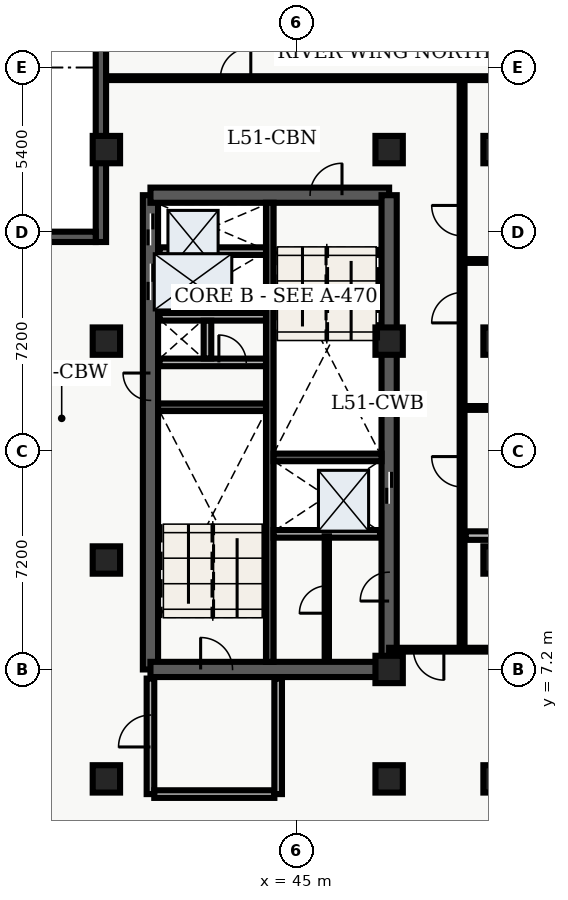
"""IFC4 building model, lengths in metres.
Left out: names, types, materials, properties, quantities, classifications, styles, units other than length and angle.
Written with IfcOpenShell. Run it as: python <this file> out.ifc"""

import sys

from ifc_helpers import new_model, entity, si_unit, converted_unit, direction, frame, origin_with_axes, origin_2d_with_axis, place, context, subcontext, project, spatial, polyline, rectangle, outline, extrude, element, fill, save


model = new_model("IFC4")
c1 = context("Model", 3, precision=1e-05, world=origin_with_axes(), true_north=direction((0.0, 1.0)))
c2 = subcontext(c1, "Body", "Model", "MODEL_VIEW")
j1 = project(units=[si_unit("LENGTHUNIT", "METRE"), converted_unit("PLANEANGLEUNIT", "DEGREE", entity("IfcPlaneAngleMeasure", 0.017), si_unit("PLANEANGLEUNIT", "RADIAN"), dimensions=[0, 0, 0, 0, 0, 0, 0])], contexts=[c1])
p1 = place(None, origin_with_axes())
s1 = spatial("IfcSite", under=j1, at=p1, CompositionType="ELEMENT")
p2 = place(p1, origin_with_axes())
s2 = spatial("IfcBuilding", under=s1, at=p2, CompositionType="ELEMENT")
p3 = place(p2, frame((0.0, 0.0, 208.2), z_axis=(0.0, 0.0, 1.0), x_axis=(1.0, 0.0, 0.0)))
s3 = spatial("IfcBuildingStorey", under=s2, at=p3, CompositionType="ELEMENT", Elevation=208.2)
p4 = place(p3, frame((40.2, 7.2, 0.0), z_axis=(0.0, 0.0, 1.0), x_axis=(0.0, 1.0, 0.0)))
e1 = element("IfcWall", 1, at=p4, inside=s3, PredefinedType="SHEAR", context=c2, shape_type="SweptSolid", body=[
    extrude(outline(polyline([(0.0, -0.25), (15.6, -0.25), (15.6, 0.25), (0.0, 0.25), (0.0, -0.25)])), origin_with_axes(), (0.0, 0.0, 1.0), 3.66),
])
p5 = place(p4, frame((14.475, 0.0, 0.0), z_axis=(0.0, 0.0, 1.0), x_axis=(1.0, 0.0, 0.0)))
e2 = element("IfcOpeningElement", 2, at=p5, cuts=e1, PredefinedType="OPENING", context=c2, shape_type="SweptSolid", body=[
    extrude(rectangle(XDim=1.05, YDim=0.52, at=origin_2d_with_axis()), origin_with_axes(), (0.0, 0.0, 1.0), 2.15),
])
p6 = place(p4, frame((12.75, 0.0, 0.0), z_axis=(0.0, 0.0, 1.0), x_axis=(1.0, 0.0, 0.0)))
e3 = element("IfcOpeningElement", 3, at=p6, cuts=e1, PredefinedType="OPENING", context=c2, shape_type="SweptSolid", body=[
    extrude(rectangle(XDim=1.2, YDim=0.52, at=origin_2d_with_axis()), origin_with_axes(), (0.0, 0.0, 1.0), 2.15),
])
p7 = place(p4, frame((9.3, 0.0, 0.0), z_axis=(0.0, 0.0, 1.0), x_axis=(1.0, 0.0, 0.0)))
e4 = element("IfcOpeningElement", 4, at=p7, cuts=e1, PredefinedType="OPENING", context=c2, shape_type="SweptSolid", body=[
    extrude(rectangle(XDim=0.9, YDim=0.52, at=origin_2d_with_axis()), origin_with_axes(), (0.0, 0.0, 1.0), 2.15),
])
p8 = place(p3, frame((40.2, 7.2, 0.0), z_axis=(0.0, 0.0, 1.0), x_axis=(1.0, 0.0, 0.0)))
e5 = element("IfcWall", 5, at=p8, inside=s3, PredefinedType="SHEAR", context=c2, shape_type="SweptSolid", body=[
    extrude(outline(polyline([(0.0, -0.25), (7.85, -0.25), (7.85, 0.25), (0.0, 0.25), (0.0, -0.25)])), origin_with_axes(), (0.0, 0.0, 1.0), 3.66),
])
p9 = place(p8, frame((2.175, 0.0, 0.0), z_axis=(0.0, 0.0, 1.0), x_axis=(1.0, 0.0, 0.0)))
e6 = element("IfcOpeningElement", 6, at=p9, cuts=e5, PredefinedType="OPENING", context=c2, shape_type="SweptSolid", body=[
    extrude(rectangle(XDim=1.05, YDim=0.52, at=origin_2d_with_axis()), origin_with_axes(), (0.0, 0.0, 1.0), 2.15),
])
p10 = place(p3, frame((40.2, 22.8, 0.0), z_axis=(0.0, 0.0, 1.0), x_axis=(1.0, 0.0, 0.0)))
e7 = element("IfcWall", 7, at=p10, inside=s3, PredefinedType="SHEAR", context=c2, shape_type="SweptSolid", body=[
    extrude(outline(polyline([(0.0, -0.25), (7.85, -0.25), (7.85, 0.25), (0.0, 0.25), (0.0, -0.25)])), origin_with_axes(), (0.0, 0.0, 1.0), 3.66),
])
p11 = place(p10, frame((5.775, 0.0, 0.0), z_axis=(0.0, 0.0, 1.0), x_axis=(1.0, 0.0, 0.0)))
e8 = element("IfcOpeningElement", 8, at=p11, cuts=e7, PredefinedType="OPENING", context=c2, shape_type="SweptSolid", body=[
    extrude(rectangle(XDim=1.05, YDim=0.52, at=origin_2d_with_axis()), origin_with_axes(), (0.0, 0.0, 1.0), 2.15),
])
p12 = place(p3, frame((48.05, 7.2, 0.0), z_axis=(0.0, 0.0, 1.0), x_axis=(0.0, 1.0, 0.0)))
e9 = element("IfcWall", 9, at=p12, inside=s3, PredefinedType="SHEAR", context=c2, shape_type="SweptSolid", body=[
    extrude(outline(polyline([(0.0, -0.25), (15.6, -0.25), (15.6, 0.25), (0.0, 0.25), (0.0, -0.25)])), origin_with_axes(), (0.0, 0.0, 1.0), 3.66),
])
p13 = place(p12, frame((5.975, 0.0, 0.0), z_axis=(0.0, 0.0, 1.0), x_axis=(1.0, 0.0, 0.0)))
e10 = element("IfcOpeningElement", 10, at=p13, cuts=e9, PredefinedType="OPENING", context=c2, shape_type="SweptSolid", body=[
    extrude(rectangle(XDim=1.05, YDim=0.52, at=origin_2d_with_axis()), origin_with_axes(), (0.0, 0.0, 1.0), 2.15),
])
p14 = place(p12, frame((2.725, 0.0, 0.0), z_axis=(0.0, 0.0, 1.0), x_axis=(1.0, 0.0, 0.0)))
e11 = element("IfcOpeningElement", 11, at=p14, cuts=e9, PredefinedType="OPENING", context=c2, shape_type="SweptSolid", body=[
    extrude(rectangle(XDim=0.95, YDim=0.52, at=origin_2d_with_axis()), origin_with_axes(), (0.0, 0.0, 1.0), 2.15),
])
p15 = place(p3, frame((44.125, 7.45, 0.0), z_axis=(0.0, 0.0, 1.0), x_axis=(0.0, 1.0, 0.0)))
e12 = element("IfcWall", 12, at=p15, inside=s3, PredefinedType="SHEAR", context=c2, shape_type="SweptSolid", body=[
    extrude(outline(polyline([(0.0, -0.125), (15.1, -0.125), (15.1, 0.125), (0.0, 0.125), (0.0, -0.125)])), origin_with_axes(), (0.0, 0.0, 1.0), 3.66),
])
for number, where, z_axis, x_axis in (
    (13, (40.45, 15.825, 0.0), (0.0, 0.0, 1.0), (1.0, 0.0, 0.0)),
    (14, (44.25, 14.175, 0.0), (0.0, 0.0, 1.0), (1.0, 0.0, 0.0)),
):
    element("IfcWall", number, at=place(p3, frame(where, z_axis=z_axis, x_axis=x_axis)), inside=s3, PredefinedType="SHEAR", context=c2, shape_type="SweptSolid", body=[
        extrude(outline(polyline([(0.0, -0.125), (3.55, -0.125), (3.55, 0.125), (0.0, 0.125), (0.0, -0.125)])), origin_with_axes(), (0.0, 0.0, 1.0), 3.66),
    ])
p16 = place(p3, frame((40.5, 17.3, 0.0), z_axis=(0.0, 0.0, 1.0), x_axis=(1.0, 0.0, 0.0)))
e15 = element("IfcWall", 15, at=p16, inside=s3, PredefinedType="SOLIDWALL", context=c2, shape_type="SweptSolid", body=[
    extrude(outline(polyline([(0.0, -0.125), (3.5, -0.125), (3.5, 0.125), (0.0, 0.125), (0.0, -0.125)])), origin_with_axes(), (0.0, 0.0, 1.0), 2.7),
])
p17 = place(p16, frame((2.4, 0.0, 0.0), z_axis=(0.0, 0.0, 1.0), x_axis=(1.0, 0.0, 0.0)))
e16 = element("IfcOpeningElement", 16, at=p17, cuts=e15, PredefinedType="OPENING", context=c2, shape_type="SweptSolid", body=[
    extrude(rectangle(XDim=0.9, YDim=0.27, at=origin_2d_with_axis()), origin_with_axes(), (0.0, 0.0, 1.0), 2.15),
])
p18 = place(p3, frame((40.5, 18.8, 0.0), z_axis=(0.0, 0.0, 1.0), x_axis=(1.0, 0.0, 0.0)))
e17 = element("IfcWall", 17, at=p18, inside=s3, PredefinedType="SOLIDWALL", context=c2, shape_type="SweptSolid", body=[
    extrude(outline(polyline([(0.0, -0.125), (3.5, -0.125), (3.5, 0.125), (0.0, 0.125), (0.0, -0.125)])), origin_with_axes(), (0.0, 0.0, 1.0), 2.7),
])
p19 = place(p3, frame((42.075, 17.43, 0.0), z_axis=(0.0, 0.0, 1.0), x_axis=(0.0, 1.0, 0.0)))
e18 = element("IfcWall", 18, at=p19, inside=s3, PredefinedType="SOLIDWALL", context=c2, shape_type="SweptSolid", body=[
    extrude(outline(polyline([(0.0, -0.125), (1.24, -0.125), (1.24, 0.125), (0.0, 0.125), (0.0, -0.125)])), origin_with_axes(), (0.0, 0.0, 1.0), 2.7),
])
p20 = place(p3, frame((40.2, 3.1, 0.0), z_axis=(0.0, 0.0, 1.0), x_axis=(0.0, 1.0, 0.0)))
e19 = element("IfcWall", 19, at=p20, inside=s3, PredefinedType="SOLIDWALL", context=c2, shape_type="SweptSolid", body=[
    extrude(outline(polyline([(0.0, -0.125), (3.8, -0.125), (3.8, 0.125), (0.0, 0.125), (0.0, -0.125)])), origin_with_axes(), (0.0, 0.0, 1.0), 2.7),
])
p21 = place(p20, frame((2.075, 0.0, 0.0), z_axis=(0.0, 0.0, 1.0), x_axis=(1.0, 0.0, 0.0)))
e20 = element("IfcOpeningElement", 20, at=p21, cuts=e19, PredefinedType="OPENING", context=c2, shape_type="SweptSolid", body=[
    extrude(rectangle(XDim=1.05, YDim=0.27, at=origin_2d_with_axis()), origin_with_axes(), (0.0, 0.0, 1.0), 2.15),
])
p22 = place(p3, frame((40.325, 3.1, 0.0), z_axis=(0.0, 0.0, 1.0), x_axis=(1.0, 0.0, 0.0)))
e21 = element("IfcWall", 21, at=p22, inside=s3, PredefinedType="SOLIDWALL", context=c2, shape_type="SweptSolid", body=[
    extrude(outline(polyline([(0.0, -0.125), (3.95, -0.125), (3.95, 0.125), (0.0, 0.125), (0.0, -0.125)])), origin_with_axes(), (0.0, 0.0, 1.0), 2.7),
])
p23 = place(p3, frame((44.4, 3.1, 0.0), z_axis=(0.0, 0.0, 1.0), x_axis=(0.0, 1.0, 0.0)))
e22 = element("IfcWall", 22, at=p23, inside=s3, PredefinedType="SOLIDWALL", context=c2, shape_type="SweptSolid", body=[
    extrude(outline(polyline([(0.0, -0.125), (3.8, -0.125), (3.8, 0.125), (0.0, 0.125), (0.0, -0.125)])), origin_with_axes(), (0.0, 0.0, 1.0), 2.7),
])
for number, where, z_axis, x_axis in (
    (23, (38.75, 3.6, 0.0), (0.0, 0.0, 1.0), (1.0, 0.0, 0.0)),
    (24, (38.75, 10.8, 0.0), (0.0, 0.0, 1.0), (1.0, 0.0, 0.0)),
    (25, (38.75, 18.0, 0.0), (0.0, 0.0, 1.0), (1.0, 0.0, 0.0)),
    (26, (38.75, 24.3, 0.0), (0.0, 0.0, 1.0), (1.0, 0.0, 0.0)),
    (27, (48.05, 3.6, 0.0), (0.0, 0.0, 1.0), (1.0, 0.0, 0.0)),
    (28, (48.05, 7.2, 0.0), (0.0, 0.0, 1.0), (1.0, 0.0, 0.0)),
    (29, (48.05, 18.0, 0.0), (0.0, 0.0, 1.0), (1.0, 0.0, 0.0)),
    (30, (48.05, 24.3, 0.0), (0.0, 0.0, 1.0), (1.0, 0.0, 0.0)),
    (31, (51.6, 3.6, 0.0), (0.0, 0.0, 1.0), (1.0, 0.0, 0.0)),
    (32, (51.6, 10.8, 0.0), (0.0, 0.0, 1.0), (1.0, 0.0, 0.0)),
    (33, (51.6, 18.0, 0.0), (0.0, 0.0, 1.0), (1.0, 0.0, 0.0)),
    (34, (51.6, 24.3, 0.0), (0.0, 0.0, 1.0), (1.0, 0.0, 0.0)),
):
    element("IfcColumn", number, at=place(p3, frame(where, z_axis=z_axis, x_axis=x_axis)), inside=s3, PredefinedType="COLUMN", context=c2, shape_type="SweptSolid", body=[
        extrude(rectangle(XDim=0.9, YDim=0.9, at=origin_2d_with_axis()), origin_with_axes(), (0.0, 0.0, 1.0), 3.9),
    ])
for number, where, z_axis, x_axis in (
    (35, (40.5, 20.96, 0.0), (0.0, 0.0, 1.0), (1.0, 0.0, 0.0)),
    (36, (44.25, 11.66, 0.0), (0.0, 0.0, 1.0), (1.0, 0.0, 0.0)),
):
    element("IfcWall", number, at=place(p3, frame(where, z_axis=z_axis, x_axis=x_axis)), inside=s3, PredefinedType="SOLIDWALL", context=c2, shape_type="SweptSolid", body=[
        extrude(outline(polyline([(0.0, -0.125), (3.5, -0.125), (3.5, 0.125), (0.0, 0.125), (0.0, -0.125)])), origin_with_axes(), (0.0, 0.0, 1.0), 2.7),
    ])
p24 = place(p3, frame((46.0, 7.5, 0.0), z_axis=(0.0, 0.0, 1.0), x_axis=(0.0, 1.0, 0.0)))
e37 = element("IfcWall", 37, at=p24, inside=s3, PredefinedType="PARTITIONING", context=c2, shape_type="SweptSolid", body=[
    extrude(outline(polyline([(0.0, -0.07), (4.08, -0.07), (4.08, 0.07), (0.0, 0.07), (0.0, -0.07)])), origin_with_axes(), (0.0, 0.0, 1.0), 2.7),
])
p25 = place(p24, frame((2.0, 0.0, 0.0), z_axis=(0.0, 0.0, 1.0), x_axis=(1.0, 0.0, 0.0)))
e38 = element("IfcOpeningElement", 38, at=p25, cuts=e37, PredefinedType="OPENING", context=c2, shape_type="SweptSolid", body=[
    extrude(rectangle(XDim=0.9, YDim=0.16, at=origin_2d_with_axis()), origin_with_axes(), (0.0, 0.0, 1.0), 2.15),
])
p26 = place(p3, frame((50.45, 7.85, 0.0), z_axis=(0.0, 0.0, 1.0), x_axis=(0.0, 1.0, 0.0)))
e39 = element("IfcWall", 39, at=p26, inside=s3, PredefinedType="PARTITIONING", context=c2, shape_type="SweptSolid", body=[
    extrude(outline(polyline([(0.0, -0.08), (18.8, -0.08), (18.8, 0.08), (0.0, 0.08), (0.0, -0.08)])), origin_with_axes(), (0.0, 0.0, 1.0), 2.7),
])
p27 = place(p26, frame((5.852, 0.0, 0.0), z_axis=(0.0, 0.0, 1.0), x_axis=(1.0, 0.0, 0.0)))
e40 = element("IfcOpeningElement", 40, at=p27, cuts=e39, PredefinedType="OPENING", context=c2, shape_type="SweptSolid", body=[
    extrude(rectangle(XDim=1.0, YDim=0.18, at=origin_2d_with_axis()), origin_with_axes(), (0.0, 0.0, 1.0), 2.15),
])
p28 = place(p26, frame((11.249, 0.0, 0.0), z_axis=(0.0, 0.0, 1.0), x_axis=(1.0, 0.0, 0.0)))
e41 = element("IfcOpeningElement", 41, at=p28, cuts=e39, PredefinedType="OPENING", context=c2, shape_type="SweptSolid", body=[
    extrude(rectangle(XDim=1.0, YDim=0.18, at=origin_2d_with_axis()), origin_with_axes(), (0.0, 0.0, 1.0), 2.15),
])
p29 = place(p26, frame((14.113, 0.0, 0.0), z_axis=(0.0, 0.0, 1.0), x_axis=(1.0, 0.0, 0.0)))
e42 = element("IfcOpeningElement", 42, at=p29, cuts=e39, PredefinedType="OPENING", context=c2, shape_type="SweptSolid", body=[
    extrude(rectangle(XDim=1.0, YDim=0.18, at=origin_2d_with_axis()), origin_with_axes(), (0.0, 0.0, 1.0), 2.15),
])
p30 = place(p3, frame((59.665, 7.85, 0.0), z_axis=(0.0, 0.0, 1.0), x_axis=(-1.0, 0.0, 0.0)))
e43 = element("IfcWall", 43, at=p30, inside=s3, PredefinedType="PARTITIONING", context=c2, shape_type="SweptSolid", body=[
    extrude(outline(polyline([(0.0, -0.062), (11.615, -0.062), (11.615, 0.062), (0.0, 0.062), (0.0, -0.062)])), origin_with_axes(), (0.0, 0.0, 1.0), 2.7),
])
p31 = place(p30, frame((10.315, 0.0, 0.0), z_axis=(0.0, 0.0, 1.0), x_axis=(1.0, 0.0, 0.0)))
e44 = element("IfcOpeningElement", 44, at=p31, cuts=e43, PredefinedType="OPENING", context=c2, shape_type="SweptSolid", body=[
    extrude(rectangle(XDim=1.0, YDim=0.145, at=origin_2d_with_axis()), origin_with_axes(), (0.0, 0.0, 1.0), 2.15),
])
p32 = place(p3, frame((38.735, 26.65, 0.0), z_axis=(0.0, 0.0, 1.0), x_axis=(1.0, 0.0, 0.0)))
e45 = element("IfcWall", 45, at=p32, inside=s3, PredefinedType="PARTITIONING", context=c2, shape_type="SweptSolid", body=[
    extrude(outline(polyline([(0.0, -0.062), (20.905, -0.062), (20.905, 0.062), (0.0, 0.062), (0.0, -0.062)])), origin_with_axes(), (0.0, 0.0, 1.0), 2.7),
])
p33 = place(p32, frame((4.265, 0.0, 0.0), z_axis=(0.0, 0.0, 1.0), x_axis=(1.0, 0.0, 0.0)))
e46 = element("IfcOpeningElement", 46, at=p33, cuts=e45, PredefinedType="OPENING", context=c2, shape_type="SweptSolid", body=[
    extrude(rectangle(XDim=1.0, YDim=0.145, at=origin_2d_with_axis()), origin_with_axes(), (0.0, 0.0, 1.0), 2.15),
])
p34 = place(p3, frame((50.57, 11.603, 0.0), z_axis=(0.0, 0.0, 1.0), x_axis=(1.0, 0.0, 0.0)))
e47 = element("IfcWall", 47, at=p34, inside=s3, PredefinedType="PARTITIONING", context=c2, shape_type="SweptSolid", body=[
    extrude(outline(polyline([(0.0, -0.14), (9.095, -0.14), (9.095, 0.14), (0.0, 0.14), (0.0, -0.14)])), origin_with_axes(), (0.0, 0.0, 1.0), 2.7),
])
p35 = place(p34, frame((4.525, 0.0, 0.0), z_axis=(0.0, 0.0, 1.0), x_axis=(1.0, 0.0, 0.0)))
e48 = element("IfcOpeningElement", 48, at=p35, cuts=e47, PredefinedType="OPENING", context=c2, shape_type="SweptSolid", body=[
    extrude(rectangle(XDim=0.95, YDim=0.3, at=origin_2d_with_axis()), origin_with_axes(), (0.0, 0.0, 1.0), 2.15),
])
for number, where, z_axis, x_axis in (
    (49, (50.57, 15.801, 0.0), (0.0, 0.0, 1.0), (1.0, 0.0, 0.0)),
    (50, (50.57, 20.636, 0.0), (0.0, 0.0, 1.0), (1.0, 0.0, 0.0)),
):
    element("IfcWall", number, at=place(p3, frame(where, z_axis=z_axis, x_axis=x_axis)), inside=s3, PredefinedType="PARTITIONING", context=c2, shape_type="SweptSolid", body=[
        extrude(outline(polyline([(0.0, -0.062), (9.095, -0.062), (9.095, 0.062), (0.0, 0.062), (0.0, -0.062)])), origin_with_axes(), (0.0, 0.0, 1.0), 2.7),
    ])
p36 = place(p3, frame((38.57, 21.26, 0.0), z_axis=(0.0, 0.0, 1.0), x_axis=(0.0, 1.0, 0.0)))
e51 = element("IfcWall", 51, at=p36, inside=s3, PredefinedType="SOLIDWALL", context=c2, shape_type="SweptSolid", body=[
    extrude(outline(polyline([(0.0, -0.17), (7.54, -0.17), (7.54, 0.17), (0.0, 0.17), (0.0, -0.17)])), origin_with_axes(), (0.0, 0.0, 1.0), 3.66),
])
p37 = place(p3, frame((30.346, 21.43, 0.0), z_axis=(0.0, 0.0, 1.0), x_axis=(1.0, 0.0, 0.0)))
e52 = element("IfcWall", 52, at=p37, inside=s3, PredefinedType="SOLIDWALL", context=c2, shape_type="SweptSolid", body=[
    extrude(outline(polyline([(0.0, -0.17), (8.054, -0.17), (8.054, 0.17), (0.0, 0.17), (0.0, -0.17)])), origin_with_axes(), (0.0, 0.0, 1.0), 3.66),
])
p38 = place(p37, frame((4.027, 0.0, 0.45), z_axis=(0.0, 0.0, 1.0), x_axis=(1.0, 0.0, 0.0)))
e53 = element("IfcOpeningElement", 53, at=p38, cuts=e52, PredefinedType="OPENING", context=c2, shape_type="SweptSolid", body=[
    extrude(rectangle(XDim=1.8, YDim=0.36, at=origin_2d_with_axis()), origin_with_axes(), (0.0, 0.0, 1.0), 2.1),
])
p39 = place(p12, frame((5.975, 0.0, 0.0), z_axis=(0.0, 0.0, 1.0), x_axis=(1.0, 0.0, 0.0)))
e54 = element("IfcDoor", 54, at=p39, inside=s3, OperationType="SLIDING_TO_LEFT", PredefinedType="DOOR", context=c2, shape_type="SweptSolid", body=[
    extrude(rectangle(XDim=1.05, YDim=0.09, at=origin_2d_with_axis()), origin_with_axes(), (0.0, 0.0, 1.0), 2.15),
])
fill(e10, e54)
p40 = place(p4, frame((14.475, 0.0, 0.0), z_axis=(0.0, 0.0, 1.0), x_axis=(1.0, 0.0, 0.0)))
e55 = element("IfcDoor", 55, at=p40, inside=s3, OperationType="SLIDING_TO_RIGHT", PredefinedType="DOOR", context=c2, shape_type="SweptSolid", body=[
    extrude(rectangle(XDim=1.05, YDim=0.09, at=origin_2d_with_axis()), origin_with_axes(), (0.0, 0.0, 1.0), 2.15),
])
fill(e2, e55)
p41 = place(p4, frame((12.75, 0.0, 0.0), z_axis=(0.0, 0.0, 1.0), x_axis=(1.0, 0.0, 0.0)))
e56 = element("IfcDoor", 56, at=p41, inside=s3, OperationType="DOUBLE_DOOR_SLIDING", PredefinedType="DOOR", context=c2, shape_type="SweptSolid", body=[
    extrude(rectangle(XDim=1.2, YDim=0.09, at=origin_2d_with_axis()), origin_with_axes(), (0.0, 0.0, 1.0), 2.15),
])
fill(e3, e56)
p42 = place(p4, frame((9.3, 0.0, 0.0), z_axis=(0.0, 0.0, 1.0), x_axis=(1.0, 0.0, 0.0)))
e57 = element("IfcDoor", 57, at=p42, inside=s3, OperationType="SINGLE_SWING_RIGHT", PredefinedType="DOOR", context=c2, shape_type="SweptSolid", body=[
    extrude(rectangle(XDim=0.9, YDim=0.09, at=origin_2d_with_axis()), origin_with_axes(), (0.0, 0.0, 1.0), 2.15),
])
fill(e4, e57)
p43 = place(p16, frame((2.4, 0.0, 0.0), z_axis=(0.0, 0.0, 1.0), x_axis=(1.0, 0.0, 0.0)))
e58 = element("IfcDoor", 58, at=p43, inside=s3, OperationType="SINGLE_SWING_LEFT", PredefinedType="DOOR", context=c2, shape_type="SweptSolid", body=[
    extrude(rectangle(XDim=0.9, YDim=0.09, at=origin_2d_with_axis()), origin_with_axes(), (0.0, 0.0, 1.0), 2.15),
])
fill(e16, e58)
p44 = place(p8, frame((2.175, 0.0, 0.0), z_axis=(0.0, 0.0, 1.0), x_axis=(1.0, 0.0, 0.0)))
e59 = element("IfcDoor", 59, at=p44, inside=s3, OperationType="SINGLE_SWING_LEFT", PredefinedType="DOOR", context=c2, shape_type="SweptSolid", body=[
    extrude(rectangle(XDim=1.05, YDim=0.09, at=origin_2d_with_axis()), origin_with_axes(), (0.0, 0.0, 1.0), 2.15),
])
fill(e6, e59)
p45 = place(p10, frame((5.775, 0.0, 0.0), z_axis=(0.0, 0.0, 1.0), x_axis=(1.0, 0.0, 0.0)))
e60 = element("IfcDoor", 60, at=p45, inside=s3, OperationType="SINGLE_SWING_RIGHT", PredefinedType="DOOR", context=c2, shape_type="SweptSolid", body=[
    extrude(rectangle(XDim=1.05, YDim=0.09, at=origin_2d_with_axis()), origin_with_axes(), (0.0, 0.0, 1.0), 2.15),
])
fill(e8, e60)
p46 = place(p20, frame((2.075, 0.0, 0.0), z_axis=(0.0, 0.0, 1.0), x_axis=(1.0, 0.0, 0.0)))
e61 = element("IfcDoor", 61, at=p46, inside=s3, OperationType="SINGLE_SWING_LEFT", PredefinedType="DOOR", context=c2, shape_type="SweptSolid", body=[
    extrude(rectangle(XDim=1.05, YDim=0.09, at=origin_2d_with_axis()), origin_with_axes(), (0.0, 0.0, 1.0), 2.15),
])
fill(e20, e61)
p47 = place(p24, frame((2.0, 0.0, 0.0), z_axis=(0.0, 0.0, 1.0), x_axis=(1.0, 0.0, 0.0)))
e62 = element("IfcDoor", 62, at=p47, inside=s3, OperationType="SINGLE_SWING_LEFT", PredefinedType="DOOR", context=c2, shape_type="SweptSolid", body=[
    extrude(rectangle(XDim=0.9, YDim=0.084, at=origin_2d_with_axis()), origin_with_axes(), (0.0, 0.0, 1.0), 2.15),
])
fill(e38, e62)
p48 = place(p12, frame((2.725, 0.0, 0.0), z_axis=(0.0, 0.0, 1.0), x_axis=(1.0, 0.0, 0.0)))
e63 = element("IfcDoor", 63, at=p48, inside=s3, OperationType="SINGLE_SWING_LEFT", PredefinedType="DOOR", context=c2, shape_type="SweptSolid", body=[
    extrude(rectangle(XDim=0.95, YDim=0.09, at=origin_2d_with_axis()), origin_with_axes(), (0.0, 0.0, 1.0), 2.15),
])
fill(e11, e63)
p49 = place(p30, frame((10.315, 0.0, 0.0), z_axis=(0.0, 0.0, 1.0), x_axis=(1.0, 0.0, 0.0)))
e64 = element("IfcDoor", 64, at=p49, inside=s3, OperationType="SINGLE_SWING_LEFT", PredefinedType="DOOR", context=c2, shape_type="SweptSolid", body=[
    extrude(rectangle(XDim=1.0, YDim=0.075, at=origin_2d_with_axis()), origin_with_axes(), (0.0, 0.0, 1.0), 2.15),
])
fill(e44, e64)
p50 = place(p32, frame((4.265, 0.0, 0.0), z_axis=(0.0, 0.0, 1.0), x_axis=(1.0, 0.0, 0.0)))
e65 = element("IfcDoor", 65, at=p50, inside=s3, OperationType="SINGLE_SWING_RIGHT", PredefinedType="DOOR", context=c2, shape_type="SweptSolid", body=[
    extrude(rectangle(XDim=1.0, YDim=0.075, at=origin_2d_with_axis()), origin_with_axes(), (0.0, 0.0, 1.0), 2.15),
])
fill(e46, e65)
p51 = place(p26, frame((5.852, 0.0, 0.0), z_axis=(0.0, 0.0, 1.0), x_axis=(1.0, 0.0, 0.0)))
e66 = element("IfcDoor", 66, at=p51, inside=s3, OperationType="SINGLE_SWING_RIGHT", PredefinedType="DOOR", context=c2, shape_type="SweptSolid", body=[
    extrude(rectangle(XDim=1.0, YDim=0.09, at=origin_2d_with_axis()), origin_with_axes(), (0.0, 0.0, 1.0), 2.15),
])
fill(e40, e66)
p52 = place(p26, frame((11.249, 0.0, 0.0), z_axis=(0.0, 0.0, 1.0), x_axis=(1.0, 0.0, 0.0)))
e67 = element("IfcDoor", 67, at=p52, inside=s3, OperationType="SINGLE_SWING_LEFT", PredefinedType="DOOR", context=c2, shape_type="SweptSolid", body=[
    extrude(rectangle(XDim=1.0, YDim=0.09, at=origin_2d_with_axis()), origin_with_axes(), (0.0, 0.0, 1.0), 2.15),
])
fill(e41, e67)
p53 = place(p26, frame((14.113, 0.0, 0.0), z_axis=(0.0, 0.0, 1.0), x_axis=(1.0, 0.0, 0.0)))
e68 = element("IfcDoor", 68, at=p53, inside=s3, OperationType="SINGLE_SWING_RIGHT", PredefinedType="DOOR", context=c2, shape_type="SweptSolid", body=[
    extrude(rectangle(XDim=1.0, YDim=0.09, at=origin_2d_with_axis()), origin_with_axes(), (0.0, 0.0, 1.0), 2.15),
])
fill(e42, e68)
save(model, sys.argv[1])
